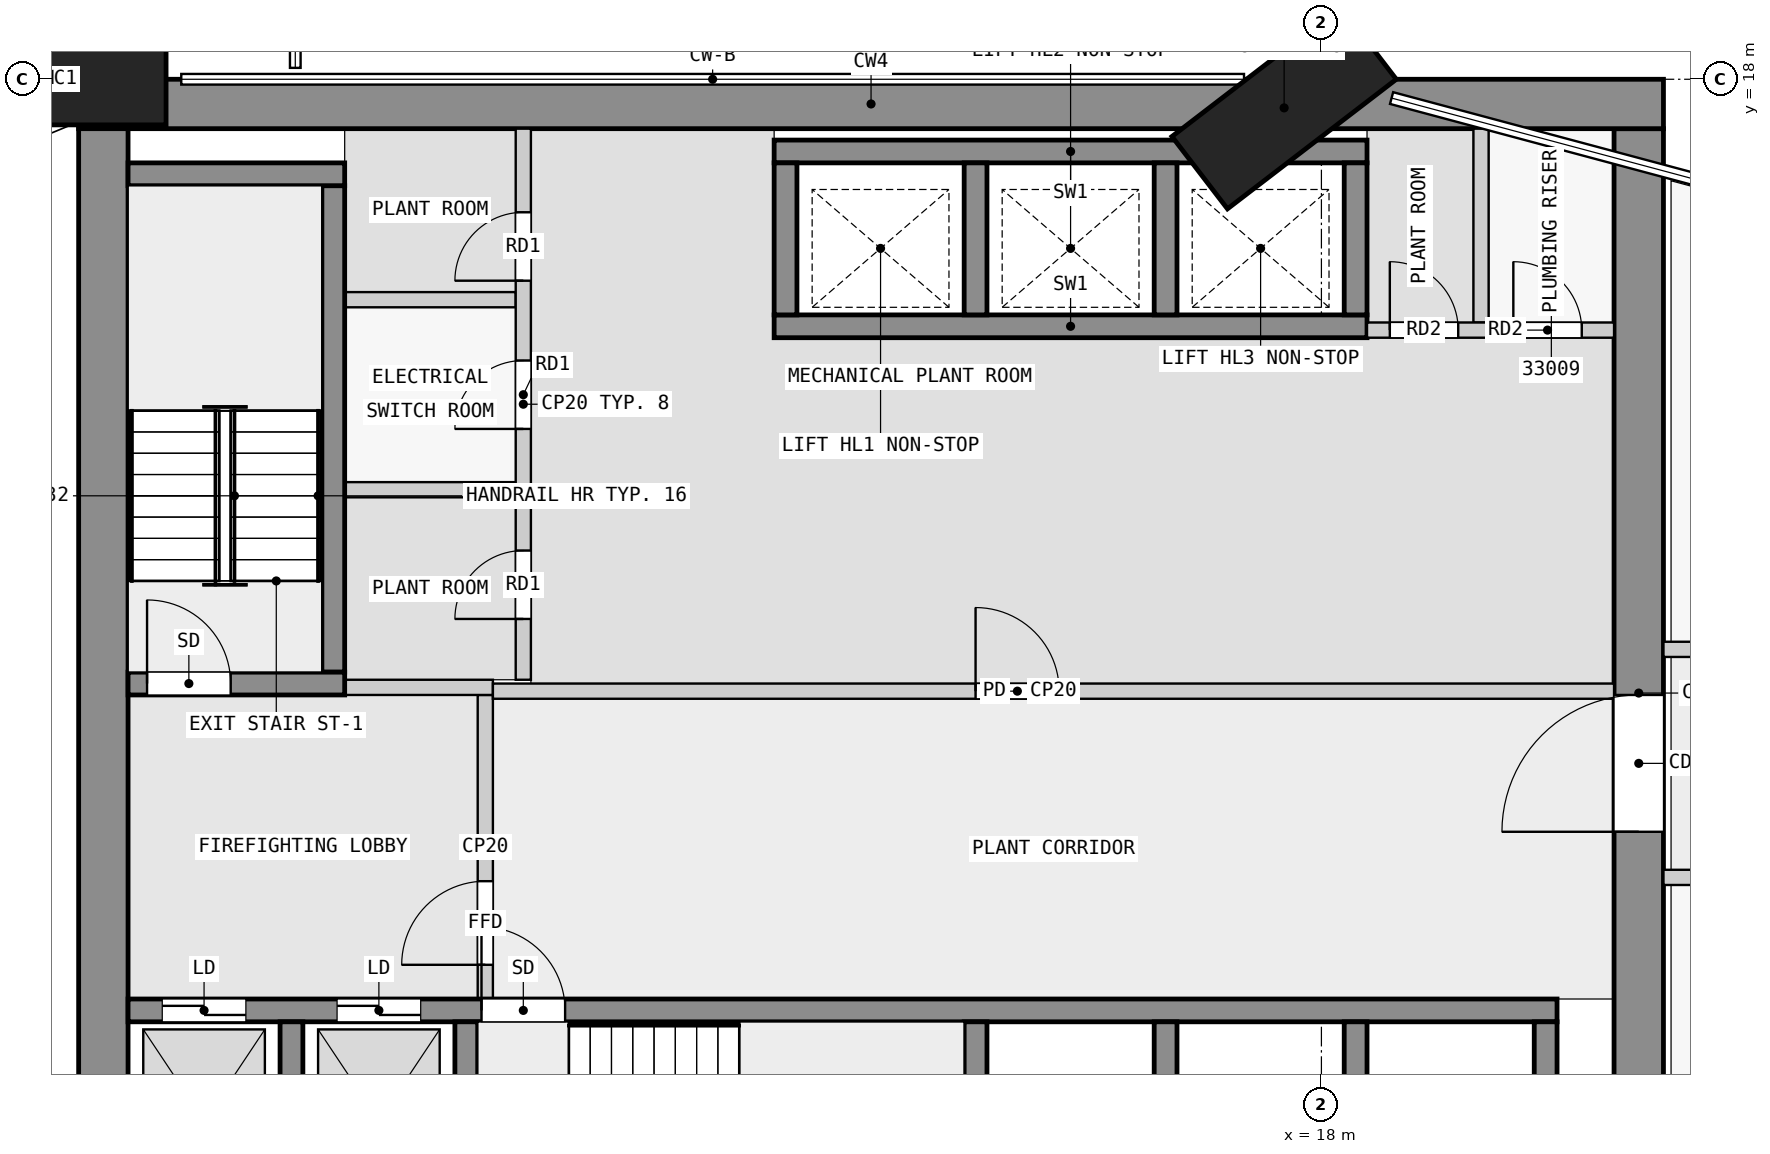
"""IFC4 building model, lengths in metres.
Left out: names, types, materials, properties, quantities, classifications, styles, units other than length and angle.
Written with IfcOpenShell. Run it as: python <this file> out.ifc"""

import sys

from ifc_helpers import new_model, si_unit, direction, frame, frame_2d, origin, origin_2d, place, context, subcontext, project, spatial, rectangle, extrude, element, fill, save


model = new_model("IFC4")
c1 = context("Model", 3, precision=1e-05, world=origin(), true_north=direction((0.0, 1.0)))
c2 = subcontext(c1, "Body", "Model", "MODEL_VIEW")
j1 = project(units=[si_unit("LENGTHUNIT", "METRE"), si_unit("PLANEANGLEUNIT", "RADIAN")], contexts=[c1])
p1 = place(None, origin())
s1 = spatial("IfcSite", under=j1, at=p1, CompositionType="ELEMENT")
p2 = place(p1, origin())
s2 = spatial("IfcBuilding", under=s1, at=p2, CompositionType="ELEMENT")
p3 = place(p2, frame((0.0, 0.0, 128.6)))
s3 = spatial("IfcBuildingStorey", under=s2, at=p3, CompositionType="ELEMENT", Elevation=128.6)
for number, where, z_axis, x_axis in (
    (1, (17.51, 17.624, 0.0), (0.0, 0.0, 1.0), (-0.609, 0.793, 0.0)),
    (2, (1.4, 18.0, 0.0), (0.0, 0.0, 1.0), (0.0, 1.0, 0.0)),
):
    element("IfcColumn", number, at=place(p3, frame(where, z_axis=z_axis, x_axis=x_axis)), inside=s3, PredefinedType="COLUMN", context=c2, shape_type="SweptSolid", body=[
        extrude(rectangle(XDim=1.2, YDim=2.8, at=origin_2d()), origin(), (0.0, 0.0, 1.0), 6.0),
    ])
p4 = place(p3, frame((1.65, 17.675, 0.0), z_axis=(0.0, 0.0, 1.0), x_axis=(1.0, 0.0, 0.0)))
e3 = element("IfcWall", 3, at=p4, inside=s3, PredefinedType="SHEAR", context=c2, shape_type="SweptSolid", body=[
    extrude(rectangle(XDim=20.85, YDim=0.65, at=frame_2d((10.425, 0.0))), origin(), (0.0, 0.0, 1.0), 5.7),
])
p5 = place(p3, frame((1.975, 2.5, 0.0), z_axis=(0.0, 0.0, 1.0), x_axis=(0.0, 1.0, 0.0)))
e4 = element("IfcWall", 4, at=p5, inside=s3, PredefinedType="SHEAR", context=c2, shape_type="SweptSolid", body=[
    extrude(rectangle(XDim=14.85, YDim=0.65, at=frame_2d((7.425, 0.0))), origin(), (0.0, 0.0, 1.0), 5.7),
])
p6 = place(p3, frame((22.175, 2.5, 0.0), z_axis=(0.0, 0.0, 1.0), x_axis=(0.0, 1.0, 0.0)))
e5 = element("IfcWall", 5, at=p6, inside=s3, PredefinedType="SHEAR", context=c2, shape_type="SweptSolid", body=[
    extrude(rectangle(XDim=14.85, YDim=0.65, at=frame_2d((7.425, 0.0))), origin(), (0.0, 0.0, 1.0), 5.7),
])
p7 = place(p6, frame((5.6, 0.0, 0.0)))
e6 = element("IfcOpeningElement", 6, at=p7, cuts=e5, PredefinedType="OPENING", context=c2, shape_type="SweptSolid", body=[
    extrude(rectangle(XDim=1.8, YDim=2.1, at=frame_2d((0.9, 1.05))), frame((0.0, 0.335, 0.0), z_axis=(0.0, -1.0, 0.0), x_axis=(1.0, 0.0, 0.0)), (0.0, 0.0, 1.0), 0.67),
])
for number, where, z_axis, x_axis in (
    (7, (4.45, 2.8, 0.0), (0.0, 0.0, 1.0), (0.0, 1.0, 0.0)),
    (8, (6.75, 2.8, 0.0), (0.0, 0.0, 1.0), (0.0, 1.0, 0.0)),
    (9, (13.45, 2.8, 0.0), (0.0, 0.0, 1.0), (0.0, 1.0, 0.0)),
    (10, (15.95, 2.8, 0.0), (0.0, 0.0, 1.0), (0.0, 1.0, 0.0)),
    (11, (18.45, 2.8, 0.0), (0.0, 0.0, 1.0), (0.0, 1.0, 0.0)),
    (12, (20.95, 2.8, 0.0), (0.0, 0.0, 1.0), (0.0, 1.0, 0.0)),
):
    element("IfcWall", number, at=place(p3, frame(where, z_axis=z_axis, x_axis=x_axis)), inside=s3, PredefinedType="SHEAR", context=c2, shape_type="SweptSolid", body=[
        extrude(rectangle(XDim=2.8, YDim=0.3, at=frame_2d((1.4, 0.0))), origin(), (0.0, 0.0, 1.0), 5.7),
    ])
p8 = place(p3, frame((2.3, 5.75, 0.0), z_axis=(0.0, 0.0, 1.0), x_axis=(1.0, 0.0, 0.0)))
e13 = element("IfcWall", 13, at=p8, inside=s3, PredefinedType="SHEAR", context=c2, shape_type="SweptSolid", body=[
    extrude(rectangle(XDim=18.8, YDim=0.3, at=frame_2d((9.4, 0.0))), origin(), (0.0, 0.0, 1.0), 5.7),
])
p9 = place(p8, frame((4.65, 0.0, 0.0)))
e14 = element("IfcOpeningElement", 14, at=p9, cuts=e13, PredefinedType="OPENING", context=c2, shape_type="SweptSolid", body=[
    extrude(rectangle(XDim=1.1, YDim=2.1, at=frame_2d((0.55, 1.05))), frame((0.0, 0.16, 0.0), z_axis=(0.0, -1.0, 0.0), x_axis=(1.0, 0.0, 0.0)), (0.0, 0.0, 1.0), 0.32),
])
p10 = place(p8, frame((0.45, 0.0, 0.0)))
e15 = element("IfcOpeningElement", 15, at=p10, cuts=e13, PredefinedType="OPENING", context=c2, shape_type="SweptSolid", body=[
    extrude(rectangle(XDim=1.1, YDim=2.1, at=frame_2d((0.55, 1.05))), frame((0.0, 0.16, 0.0), z_axis=(0.0, -1.0, 0.0), x_axis=(1.0, 0.0, 0.0)), (0.0, 0.0, 1.0), 0.32),
])
p11 = place(p8, frame((2.75, 0.0, 0.0)))
e16 = element("IfcOpeningElement", 16, at=p11, cuts=e13, PredefinedType="OPENING", context=c2, shape_type="SweptSolid", body=[
    extrude(rectangle(XDim=1.1, YDim=2.1, at=frame_2d((0.55, 1.05))), frame((0.0, 0.16, 0.0), z_axis=(0.0, -1.0, 0.0), x_axis=(1.0, 0.0, 0.0)), (0.0, 0.0, 1.0), 0.32),
])
p12 = place(p3, frame((2.3, 10.05, 0.0), z_axis=(0.0, 0.0, 1.0), x_axis=(1.0, 0.0, 0.0)))
e17 = element("IfcWall", 17, at=p12, inside=s3, PredefinedType="SHEAR", context=c2, shape_type="SweptSolid", body=[
    extrude(rectangle(XDim=2.85, YDim=0.3, at=frame_2d((1.425, 0.0))), origin(), (0.0, 0.0, 1.0), 5.7),
])
p13 = place(p12, frame((0.25, 0.0, 0.0)))
e18 = element("IfcOpeningElement", 18, at=p13, cuts=e17, PredefinedType="OPENING", context=c2, shape_type="SweptSolid", body=[
    extrude(rectangle(XDim=1.1, YDim=2.1, at=frame_2d((0.55, 1.05))), frame((0.0, 0.16, 0.0), z_axis=(0.0, -1.0, 0.0), x_axis=(1.0, 0.0, 0.0)), (0.0, 0.0, 1.0), 0.32),
])
p14 = place(p3, frame((5.0, 10.2, 0.0), z_axis=(0.0, 0.0, 1.0), x_axis=(0.0, 1.0, 0.0)))
e19 = element("IfcWall", 19, at=p14, inside=s3, PredefinedType="SHEAR", context=c2, shape_type="SweptSolid", body=[
    extrude(rectangle(XDim=6.4, YDim=0.3, at=frame_2d((3.2, 0.0))), origin(), (0.0, 0.0, 1.0), 5.7),
])
p15 = place(p3, frame((2.3, 16.75, 0.0), z_axis=(0.0, 0.0, 1.0), x_axis=(1.0, 0.0, 0.0)))
e20 = element("IfcWall", 20, at=p15, inside=s3, PredefinedType="SHEAR", context=c2, shape_type="SweptSolid", body=[
    extrude(rectangle(XDim=2.85, YDim=0.3, at=frame_2d((1.425, 0.0))), origin(), (0.0, 0.0, 1.0), 5.7),
])
for number, where, z_axis, x_axis in (
    (21, (10.8, 17.05, 0.0), (0.0, 0.0, 1.0), (1.0, 0.0, 0.0)),
    (22, (10.8, 14.75, 0.0), (0.0, 0.0, 1.0), (1.0, 0.0, 0.0)),
):
    element("IfcWall", number, at=place(p3, frame(where, z_axis=z_axis, x_axis=x_axis)), inside=s3, PredefinedType="SHEAR", context=c2, shape_type="SweptSolid", body=[
        extrude(rectangle(XDim=7.8, YDim=0.3, at=frame_2d((3.9, 0.0))), origin(), (0.0, 0.0, 1.0), 5.7),
    ])
for number, where, z_axis, x_axis in (
    (23, (10.95, 14.9, 0.0), (0.0, 0.0, 1.0), (0.0, 1.0, 0.0)),
    (24, (13.45, 14.9, 0.0), (0.0, 0.0, 1.0), (0.0, 1.0, 0.0)),
    (25, (15.95, 14.9, 0.0), (0.0, 0.0, 1.0), (0.0, 1.0, 0.0)),
    (26, (18.45, 14.9, 0.0), (0.0, 0.0, 1.0), (0.0, 1.0, 0.0)),
):
    element("IfcWall", number, at=place(p3, frame(where, z_axis=z_axis, x_axis=x_axis)), inside=s3, PredefinedType="SHEAR", context=c2, shape_type="SweptSolid", body=[
        extrude(rectangle(XDim=2.0, YDim=0.3, at=frame_2d((1.0, 0.0))), origin(), (0.0, 0.0, 1.0), 5.7),
    ])
p16 = place(p3, frame((7.0, 5.9, 0.0), z_axis=(0.0, 0.0, 1.0), x_axis=(0.0, 1.0, 0.0)))
e27 = element("IfcWall", 27, at=p16, inside=s3, PredefinedType="PARTITIONING", context=c2, shape_type="SweptSolid", body=[
    extrude(rectangle(XDim=4.0, YDim=0.2, at=frame_2d((2.0, 0.0))), origin(), (0.0, 0.0, 1.0), 5.7),
])
p17 = place(p16, frame((0.45, 0.0, 0.0)))
e28 = element("IfcOpeningElement", 28, at=p17, cuts=e27, PredefinedType="OPENING", context=c2, shape_type="SweptSolid", body=[
    extrude(rectangle(XDim=1.1, YDim=2.1, at=frame_2d((0.55, 1.05))), frame((0.0, 0.11, 0.0), z_axis=(0.0, -1.0, 0.0), x_axis=(1.0, 0.0, 0.0)), (0.0, 0.0, 1.0), 0.22),
])
p18 = place(p3, frame((5.15, 10.0, 0.0), z_axis=(0.0, 0.0, 1.0), x_axis=(1.0, 0.0, 0.0)))
e29 = element("IfcWall", 29, at=p18, inside=s3, PredefinedType="PARTITIONING", context=c2, shape_type="SweptSolid", body=[
    extrude(rectangle(XDim=1.95, YDim=0.2, at=frame_2d((0.975, 0.0))), origin(), (0.0, 0.0, 1.0), 5.7),
])
p19 = place(p3, frame((7.1, 9.95, 0.0), z_axis=(0.0, 0.0, 1.0), x_axis=(1.0, 0.0, 0.0)))
e30 = element("IfcWall", 30, at=p19, inside=s3, PredefinedType="PARTITIONING", context=c2, shape_type="SweptSolid", body=[
    extrude(rectangle(XDim=14.75, YDim=0.2, at=frame_2d((7.375, 0.0))), origin(), (0.0, 0.0, 1.0), 5.7),
])
p20 = place(p19, frame((6.35, 0.0, 0.0)))
e31 = element("IfcOpeningElement", 31, at=p20, cuts=e30, PredefinedType="OPENING", context=c2, shape_type="SweptSolid", body=[
    extrude(rectangle(XDim=1.1, YDim=2.1, at=frame_2d((0.55, 1.05))), frame((0.0, 0.11, 0.0), z_axis=(0.0, -1.0, 0.0), x_axis=(1.0, 0.0, 0.0)), (0.0, 0.0, 1.0), 0.22),
])
p21 = place(p3, frame((7.5, 10.1, 0.0), z_axis=(0.0, 0.0, 1.0), x_axis=(0.0, 1.0, 0.0)))
e32 = element("IfcWall", 32, at=p21, inside=s3, PredefinedType="PARTITIONING", context=c2, shape_type="SweptSolid", body=[
    extrude(rectangle(XDim=7.25, YDim=0.2, at=frame_2d((3.625, 0.0))), origin(), (0.0, 0.0, 1.0), 5.7),
])
p22 = place(p21, frame((0.8, 0.0, 0.0)))
e33 = element("IfcOpeningElement", 33, at=p22, cuts=e32, PredefinedType="OPENING", context=c2, shape_type="SweptSolid", body=[
    extrude(rectangle(XDim=0.9, YDim=2.1, at=frame_2d((0.45, 1.05))), frame((0.0, 0.11, 0.0), z_axis=(0.0, -1.0, 0.0), x_axis=(1.0, 0.0, 0.0)), (0.0, 0.0, 1.0), 0.22),
])
p23 = place(p21, frame((3.3, 0.0, 0.0)))
e34 = element("IfcOpeningElement", 34, at=p23, cuts=e32, PredefinedType="OPENING", context=c2, shape_type="SweptSolid", body=[
    extrude(rectangle(XDim=0.9, YDim=2.1, at=frame_2d((0.45, 1.05))), frame((0.0, 0.11, 0.0), z_axis=(0.0, -1.0, 0.0), x_axis=(1.0, 0.0, 0.0)), (0.0, 0.0, 1.0), 0.22),
])
p24 = place(p21, frame((5.25, 0.0, 0.0)))
e35 = element("IfcOpeningElement", 35, at=p24, cuts=e32, PredefinedType="OPENING", context=c2, shape_type="SweptSolid", body=[
    extrude(rectangle(XDim=0.9, YDim=2.1, at=frame_2d((0.45, 1.05))), frame((0.0, 0.11, 0.0), z_axis=(0.0, -1.0, 0.0), x_axis=(1.0, 0.0, 0.0)), (0.0, 0.0, 1.0), 0.22),
])
for number, where, z_axis, x_axis in (
    (36, (5.15, 12.6, 0.0), (0.0, 0.0, 1.0), (1.0, 0.0, 0.0)),
    (37, (5.15, 15.1, 0.0), (0.0, 0.0, 1.0), (1.0, 0.0, 0.0)),
):
    element("IfcWall", number, at=place(p3, frame(where, z_axis=z_axis, x_axis=x_axis)), inside=s3, PredefinedType="PARTITIONING", context=c2, shape_type="SweptSolid", body=[
        extrude(rectangle(XDim=2.25, YDim=0.2, at=frame_2d((1.125, 0.0))), origin(), (0.0, 0.0, 1.0), 5.7),
    ])
p25 = place(p3, frame((18.6, 14.7, 0.0), z_axis=(0.0, 0.0, 1.0), x_axis=(1.0, 0.0, 0.0)))
e38 = element("IfcWall", 38, at=p25, inside=s3, PredefinedType="PARTITIONING", context=c2, shape_type="SweptSolid", body=[
    extrude(rectangle(XDim=3.25, YDim=0.2, at=frame_2d((1.625, 0.0))), origin(), (0.0, 0.0, 1.0), 5.7),
])
p26 = place(p25, frame((0.3, 0.0, 0.0)))
e39 = element("IfcOpeningElement", 39, at=p26, cuts=e38, PredefinedType="OPENING", context=c2, shape_type="SweptSolid", body=[
    extrude(rectangle(XDim=0.9, YDim=2.1, at=frame_2d((0.45, 1.05))), frame((0.0, 0.11, 0.0), z_axis=(0.0, -1.0, 0.0), x_axis=(1.0, 0.0, 0.0)), (0.0, 0.0, 1.0), 0.22),
])
p27 = place(p25, frame((1.925, 0.0, 0.0)))
e40 = element("IfcOpeningElement", 40, at=p27, cuts=e38, PredefinedType="OPENING", context=c2, shape_type="SweptSolid", body=[
    extrude(rectangle(XDim=0.9, YDim=2.1, at=frame_2d((0.45, 1.05))), frame((0.0, 0.11, 0.0), z_axis=(0.0, -1.0, 0.0), x_axis=(1.0, 0.0, 0.0)), (0.0, 0.0, 1.0), 0.22),
])
p28 = place(p3, frame((20.1, 14.8, 0.0), z_axis=(0.0, 0.0, 1.0), x_axis=(0.0, 1.0, 0.0)))
e41 = element("IfcWall", 41, at=p28, inside=s3, PredefinedType="PARTITIONING", context=c2, shape_type="SweptSolid", body=[
    extrude(rectangle(XDim=2.55, YDim=0.2, at=frame_2d((1.275, 0.0))), origin(), (0.0, 0.0, 1.0), 5.7),
])
p29 = place(p3, frame((31.5, 7.5, 0.0), z_axis=(0.0, 0.0, 1.0), x_axis=(-1.0, 0.0, 0.0)))
e42 = element("IfcWall", 42, at=p29, inside=s3, PredefinedType="PARTITIONING", context=c2, shape_type="SweptSolid", body=[
    extrude(rectangle(XDim=9.0, YDim=0.2, at=frame_2d((4.5, 0.0))), origin(), (0.0, 0.0, 1.0), 5.7),
])
p30 = place(p29, frame((3.6, 0.0, 0.0)))
e43 = element("IfcOpeningElement", 43, at=p30, cuts=e42, PredefinedType="OPENING", context=c2, shape_type="SweptSolid", body=[
    extrude(rectangle(XDim=1.8, YDim=2.1, at=frame_2d((0.9, 1.05))), frame((0.0, 0.11, 0.0), z_axis=(0.0, -1.0, 0.0), x_axis=(1.0, 0.0, 0.0)), (0.0, 0.0, 1.0), 0.22),
])
p31 = place(p3, frame((22.5, 10.5, 0.0), z_axis=(0.0, 0.0, 1.0), x_axis=(1.0, 0.0, 0.0)))
e44 = element("IfcWall", 44, at=p31, inside=s3, PredefinedType="PARTITIONING", context=c2, shape_type="SweptSolid", body=[
    extrude(rectangle(XDim=4.5, YDim=0.2, at=frame_2d((2.25, 0.0))), origin(), (0.0, 0.0, 1.0), 5.7),
])
p32 = place(p31, frame((1.85, 0.0, 0.0)))
e45 = element("IfcOpeningElement", 45, at=p32, cuts=e44, PredefinedType="OPENING", context=c2, shape_type="SweptSolid", body=[
    extrude(rectangle(XDim=0.9, YDim=2.1, at=frame_2d((0.45, 1.05))), frame((0.0, 0.11, 0.0), z_axis=(0.0, -1.0, 0.0), x_axis=(1.0, 0.0, 0.0)), (0.0, 0.0, 1.0), 0.22),
])
p33 = place(p17, origin())
e46 = element("IfcDoor", 46, at=p33, inside=s3, OperationType="SINGLE_SWING_LEFT", PredefinedType="DOOR", context=c2, shape_type="SweptSolid", body=[
    extrude(rectangle(XDim=1.1, YDim=2.1, at=frame_2d((0.55, 1.05))), frame((0.0, 0.025, 0.0), z_axis=(0.0, -1.0, 0.0), x_axis=(1.0, 0.0, 0.0)), (0.0, 0.0, 1.0), 0.05),
])
fill(e28, e46)
p34 = place(p13, origin())
e47 = element("IfcDoor", 47, at=p34, inside=s3, OperationType="SINGLE_SWING_RIGHT", PredefinedType="DOOR", context=c2, shape_type="SweptSolid", body=[
    extrude(rectangle(XDim=1.1, YDim=2.1, at=frame_2d((0.55, 1.05))), frame((0.0, 0.025, 0.0), z_axis=(0.0, -1.0, 0.0), x_axis=(1.0, 0.0, 0.0)), (0.0, 0.0, 1.0), 0.05),
])
fill(e18, e47)
p35 = place(p20, origin())
e48 = element("IfcDoor", 48, at=p35, inside=s3, OperationType="SINGLE_SWING_LEFT", PredefinedType="DOOR", context=c2, shape_type="SweptSolid", body=[
    extrude(rectangle(XDim=1.1, YDim=2.1, at=frame_2d((0.55, 1.05))), frame((0.0, 0.025, 0.0), z_axis=(0.0, -1.0, 0.0), x_axis=(1.0, 0.0, 0.0)), (0.0, 0.0, 1.0), 0.05),
])
fill(e31, e48)
p36 = place(p9, origin())
e49 = element("IfcDoor", 49, at=p36, inside=s3, OperationType="SINGLE_SWING_LEFT", PredefinedType="DOOR", context=c2, shape_type="SweptSolid", body=[
    extrude(rectangle(XDim=1.1, YDim=2.1, at=frame_2d((0.55, 1.05))), frame((0.0, 0.025, 0.0), z_axis=(0.0, -1.0, 0.0), x_axis=(1.0, 0.0, 0.0)), (0.0, 0.0, 1.0), 0.05),
])
fill(e14, e49)
p37 = place(p10, origin())
e50 = element("IfcDoor", 50, at=p37, inside=s3, OperationType="DOUBLE_DOOR_SLIDING", PredefinedType="DOOR", context=c2, shape_type="SweptSolid", body=[
    extrude(rectangle(XDim=1.1, YDim=2.1, at=frame_2d((0.55, 1.05))), frame((0.0, 0.025, 0.0), z_axis=(0.0, -1.0, 0.0), x_axis=(1.0, 0.0, 0.0)), (0.0, 0.0, 1.0), 0.05),
])
fill(e15, e50)
p38 = place(p11, origin())
e51 = element("IfcDoor", 51, at=p38, inside=s3, OperationType="DOUBLE_DOOR_SLIDING", PredefinedType="DOOR", context=c2, shape_type="SweptSolid", body=[
    extrude(rectangle(XDim=1.1, YDim=2.1, at=frame_2d((0.55, 1.05))), frame((0.0, 0.025, 0.0), z_axis=(0.0, -1.0, 0.0), x_axis=(1.0, 0.0, 0.0)), (0.0, 0.0, 1.0), 0.05),
])
fill(e16, e51)
p39 = place(p7, origin())
e52 = element("IfcDoor", 52, at=p39, inside=s3, OperationType="DOUBLE_DOOR_SINGLE_SWING", PredefinedType="DOOR", context=c2, shape_type="SweptSolid", body=[
    extrude(rectangle(XDim=1.8, YDim=2.1, at=frame_2d((0.9, 1.05))), frame((0.0, 0.025, 0.0), z_axis=(0.0, -1.0, 0.0), x_axis=(1.0, 0.0, 0.0)), (0.0, 0.0, 1.0), 0.05),
])
fill(e6, e52)
p40 = place(p22, origin())
e53 = element("IfcDoor", 53, at=p40, inside=s3, OperationType="SINGLE_SWING_RIGHT", PredefinedType="DOOR", context=c2, shape_type="SweptSolid", body=[
    extrude(rectangle(XDim=0.9, YDim=2.1, at=frame_2d((0.45, 1.05))), frame((0.0, 0.025, 0.0), z_axis=(0.0, -1.0, 0.0), x_axis=(1.0, 0.0, 0.0)), (0.0, 0.0, 1.0), 0.05),
])
fill(e33, e53)
p41 = place(p23, origin())
e54 = element("IfcDoor", 54, at=p41, inside=s3, OperationType="SINGLE_SWING_RIGHT", PredefinedType="DOOR", context=c2, shape_type="SweptSolid", body=[
    extrude(rectangle(XDim=0.9, YDim=2.1, at=frame_2d((0.45, 1.05))), frame((0.0, 0.025, 0.0), z_axis=(0.0, -1.0, 0.0), x_axis=(1.0, 0.0, 0.0)), (0.0, 0.0, 1.0), 0.05),
])
fill(e34, e54)
p42 = place(p24, origin())
e55 = element("IfcDoor", 55, at=p42, inside=s3, OperationType="SINGLE_SWING_RIGHT", PredefinedType="DOOR", context=c2, shape_type="SweptSolid", body=[
    extrude(rectangle(XDim=0.9, YDim=2.1, at=frame_2d((0.45, 1.05))), frame((0.0, 0.025, 0.0), z_axis=(0.0, -1.0, 0.0), x_axis=(1.0, 0.0, 0.0)), (0.0, 0.0, 1.0), 0.05),
])
fill(e35, e55)
p43 = place(p26, origin())
e56 = element("IfcDoor", 56, at=p43, inside=s3, OperationType="SINGLE_SWING_LEFT", PredefinedType="DOOR", context=c2, shape_type="SweptSolid", body=[
    extrude(rectangle(XDim=0.9, YDim=2.1, at=frame_2d((0.45, 1.05))), frame((0.0, 0.025, 0.0), z_axis=(0.0, -1.0, 0.0), x_axis=(1.0, 0.0, 0.0)), (0.0, 0.0, 1.0), 0.05),
])
fill(e39, e56)
p44 = place(p27, origin())
e57 = element("IfcDoor", 57, at=p44, inside=s3, OperationType="SINGLE_SWING_LEFT", PredefinedType="DOOR", context=c2, shape_type="SweptSolid", body=[
    extrude(rectangle(XDim=0.9, YDim=2.1, at=frame_2d((0.45, 1.05))), frame((0.0, 0.025, 0.0), z_axis=(0.0, -1.0, 0.0), x_axis=(1.0, 0.0, 0.0)), (0.0, 0.0, 1.0), 0.05),
])
fill(e40, e57)
save(model, sys.argv[1])
